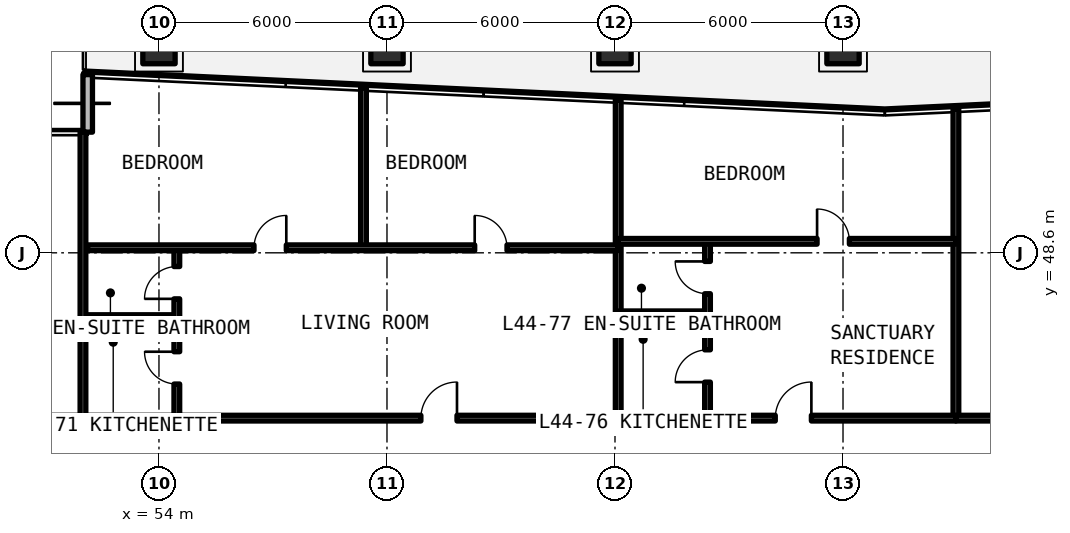
"""IFC4 building model, lengths in metres.
Left out: names, types, materials, properties, quantities, classifications, styles, units other than length and angle.
Written with IfcOpenShell. Run it as: python <this file> out.ifc"""

import sys

from ifc_helpers import new_model, si_unit, direction, frame, frame_2d, origin, origin_2d, place, context, subcontext, project, spatial, rectangle, extrude, element, fill, save


model = new_model("IFC4")
c1 = context("Model", 3, precision=1e-05, world=origin(), true_north=direction((0.0, 1.0)))
c2 = subcontext(c1, "Body", "Model", "MODEL_VIEW")
j1 = project(units=[si_unit("LENGTHUNIT", "METRE"), si_unit("PLANEANGLEUNIT", "RADIAN")], contexts=[c1])
p1 = place(None, origin())
s1 = spatial("IfcSite", under=j1, at=p1, CompositionType="ELEMENT")
p2 = place(p1, origin())
s2 = spatial("IfcBuilding", under=s1, at=p2, CompositionType="ELEMENT")
p3 = place(p2, frame((0.0, 0.0, 158.4)))
s3 = spatial("IfcBuildingStorey", under=s2, at=p3, CompositionType="ELEMENT", Elevation=158.4)
for number, where, z_axis, x_axis in (
    (1, (54.0, 54.0, 0.0), (0.0, 0.0, 1.0), (1.0, 0.0, 0.0)),
    (2, (60.0, 54.0, 0.0), (0.0, 0.0, 1.0), (1.0, 0.0, 0.0)),
    (3, (66.0, 54.0, 0.0), (0.0, 0.0, 1.0), (1.0, 0.0, 0.0)),
    (4, (72.0, 54.0, 0.0), (0.0, 0.0, 1.0), (1.0, 0.0, 0.0)),
):
    element("IfcColumn", number, at=place(p3, frame(where, z_axis=z_axis, x_axis=x_axis)), inside=s3, PredefinedType="COLUMN", context=c2, shape_type="SweptSolid", body=[
        extrude(rectangle(XDim=0.85, YDim=0.85, at=origin_2d()), origin(), (0.0, 0.0, 1.0), 3.63),
    ])
p4 = place(p3, frame((52.125, 53.289, 0.0), z_axis=(0.0, 0.0, 1.0), x_axis=(0.0, -1.0, 0.0)))
e5 = element("IfcWall", 5, at=p4, inside=s3, PredefinedType="SOLIDWALL", context=c2, shape_type="SweptSolid", body=[
    extrude(rectangle(XDim=1.514, YDim=0.25, at=frame_2d((0.757, 0.0))), origin(), (0.0, 0.0, 1.0), 3.41),
])
p5 = place(p3, frame((43.6, 44.25, 0.0), z_axis=(0.0, 0.0, 1.0), x_axis=(1.0, 0.0, 0.0)))
e6 = element("IfcWall", 6, at=p5, inside=s3, PredefinedType="SOLIDWALL", context=c2, shape_type="SweptSolid", body=[
    extrude(rectangle(XDim=8.4, YDim=0.15, at=frame_2d((4.2, 0.0))), origin(), (0.0, 0.0, 1.0), 2.63),
])
p6 = place(p5, frame((2.3, 0.0, 0.0)))
e7 = element("IfcOpeningElement", 7, at=p6, cuts=e6, PredefinedType="OPENING", context=c2, shape_type="SweptSolid", body=[
    extrude(rectangle(XDim=1.1, YDim=2.15, at=frame_2d((0.55, 1.075))), frame((0.0, 0.085, 0.0), z_axis=(0.0, -1.0, 0.0), x_axis=(1.0, 0.0, 0.0)), (0.0, 0.0, 1.0), 0.17),
])
p7 = place(p3, frame((52.0, 44.25, 0.0), z_axis=(0.0, 0.0, 1.0), x_axis=(0.0, 1.0, 0.0)))
e8 = element("IfcWall", 8, at=p7, inside=s3, PredefinedType="SOLIDWALL", context=c2, shape_type="SweptSolid", body=[
    extrude(rectangle(XDim=7.525, YDim=0.15, at=frame_2d((3.762, 0.0))), origin(), (0.0, 0.0, 1.0), 2.63),
])
p8 = place(p3, frame((66.084, 44.25, 0.0), z_axis=(0.0, 0.0, 1.0), x_axis=(0.0, 1.0, 0.0)))
e9 = element("IfcWall", 9, at=p8, inside=s3, PredefinedType="SOLIDWALL", context=c2, shape_type="SweptSolid", body=[
    extrude(rectangle(XDim=8.377, YDim=0.15, at=frame_2d((4.188, 0.0))), origin(), (0.0, 0.0, 1.0), 2.63),
])
p9 = place(p3, frame((52.12, 46.895, 0.0), z_axis=(0.0, 0.0, 1.0), x_axis=(1.0, 0.0, 0.0)))
e10 = element("IfcWall", 10, at=p9, inside=s3, PredefinedType="PARTITIONING", context=c2, shape_type="SweptSolid", body=[
    extrude(rectangle(XDim=2.35, YDim=0.15, at=frame_2d((1.175, 0.0))), origin(), (0.0, 0.0, 1.0), 2.63),
])
p10 = place(p3, frame((54.47, 44.25, 0.0), z_axis=(0.0, 0.0, 1.0), x_axis=(0.0, 1.0, 0.0)))
e11 = element("IfcWall", 11, at=p10, inside=s3, PredefinedType="PARTITIONING", context=c2, shape_type="SweptSolid", body=[
    extrude(rectangle(XDim=4.483, YDim=0.15, at=frame_2d((2.241, 0.0))), origin(), (0.0, 0.0, 1.0), 2.63),
])
p11 = place(p10, frame((0.897, 0.0, 0.0)))
e12 = element("IfcOpeningElement", 12, at=p11, cuts=e11, PredefinedType="OPENING", context=c2, shape_type="SweptSolid", body=[
    extrude(rectangle(XDim=0.85, YDim=2.1, at=frame_2d((0.425, 1.05))), frame((0.0, 0.085, 0.0), z_axis=(0.0, -1.0, 0.0), x_axis=(1.0, 0.0, 0.0)), (0.0, 0.0, 1.0), 0.17),
])
p12 = place(p10, frame((3.139, 0.0, 0.0)))
e13 = element("IfcOpeningElement", 13, at=p12, cuts=e11, PredefinedType="OPENING", context=c2, shape_type="SweptSolid", body=[
    extrude(rectangle(XDim=0.85, YDim=2.1, at=frame_2d((0.425, 1.05))), frame((0.0, 0.085, 0.0), z_axis=(0.0, -1.0, 0.0), x_axis=(1.0, 0.0, 0.0)), (0.0, 0.0, 1.0), 0.17),
])
p13 = place(p3, frame((59.382, 48.733, 0.0), z_axis=(0.0, 0.0, 1.0), x_axis=(0.0, 1.0, 0.0)))
e14 = element("IfcWall", 14, at=p13, inside=s3, PredefinedType="PARTITIONING", context=c2, shape_type="SweptSolid", body=[
    extrude(rectangle(XDim=4.212, YDim=0.15, at=frame_2d((2.106, 0.0))), origin(), (0.0, 0.0, 1.0), 2.63),
])
p14 = place(p3, frame((52.12, 48.733, 0.0), z_axis=(0.0, 0.0, 1.0), x_axis=(1.0, 0.0, 0.0)))
e15 = element("IfcWall", 15, at=p14, inside=s3, PredefinedType="PARTITIONING", context=c2, shape_type="SweptSolid", body=[
    extrude(rectangle(XDim=13.964, YDim=0.15, at=frame_2d((6.982, 0.0))), origin(), (0.0, 0.0, 1.0), 2.63),
])
p15 = place(p14, frame((4.381, 0.0, 0.0)))
e16 = element("IfcOpeningElement", 16, at=p15, cuts=e15, PredefinedType="OPENING", context=c2, shape_type="SweptSolid", body=[
    extrude(rectangle(XDim=0.85, YDim=2.1, at=frame_2d((0.425, 1.05))), frame((0.0, 0.085, 0.0), z_axis=(0.0, -1.0, 0.0), x_axis=(1.0, 0.0, 0.0)), (0.0, 0.0, 1.0), 0.17),
])
p16 = place(p14, frame((10.188, 0.0, 0.0)))
e17 = element("IfcOpeningElement", 17, at=p16, cuts=e15, PredefinedType="OPENING", context=c2, shape_type="SweptSolid", body=[
    extrude(rectangle(XDim=0.85, YDim=2.1, at=frame_2d((0.425, 1.05))), frame((0.0, 0.085, 0.0), z_axis=(0.0, -1.0, 0.0), x_axis=(1.0, 0.0, 0.0)), (0.0, 0.0, 1.0), 0.17),
])
p17 = place(p3, frame((52.12, 44.25, 0.0), z_axis=(0.0, 0.0, 1.0), x_axis=(1.0, 0.0, 0.0)))
e18 = element("IfcWall", 18, at=p17, inside=s3, PredefinedType="SOLIDWALL", context=c2, shape_type="SweptSolid", body=[
    extrude(rectangle(XDim=13.964, YDim=0.15, at=frame_2d((6.982, 0.0))), origin(), (0.0, 0.0, 1.0), 2.63),
])
p18 = place(p17, frame((8.772, 0.0, 0.0)))
e19 = element("IfcOpeningElement", 19, at=p18, cuts=e18, PredefinedType="OPENING", context=c2, shape_type="SweptSolid", body=[
    extrude(rectangle(XDim=0.95, YDim=2.15, at=frame_2d((0.475, 1.075))), frame((0.0, 0.085, 0.0), z_axis=(0.0, -1.0, 0.0), x_axis=(1.0, 0.0, 0.0)), (0.0, 0.0, 1.0), 0.17),
])
p19 = place(p3, frame((74.971, 44.25, 0.0), z_axis=(0.0, 0.0, 1.0), x_axis=(0.0, 1.0, 0.0)))
e20 = element("IfcWall", 20, at=p19, inside=s3, PredefinedType="SOLIDWALL", context=c2, shape_type="SweptSolid", body=[
    extrude(rectangle(XDim=8.134, YDim=0.15, at=frame_2d((4.067, 0.0))), origin(), (0.0, 0.0, 1.0), 2.63),
])
p20 = place(p3, frame((66.084, 46.995, 0.0), z_axis=(0.0, 0.0, 1.0), x_axis=(1.0, 0.0, 0.0)))
e21 = element("IfcWall", 21, at=p20, inside=s3, PredefinedType="PARTITIONING", context=c2, shape_type="SweptSolid", body=[
    extrude(rectangle(XDim=2.35, YDim=0.15, at=frame_2d((1.175, 0.0))), origin(), (0.0, 0.0, 1.0), 2.63),
])
p21 = place(p3, frame((68.434, 44.25, 0.0), z_axis=(0.0, 0.0, 1.0), x_axis=(0.0, 1.0, 0.0)))
e22 = element("IfcWall", 22, at=p21, inside=s3, PredefinedType="PARTITIONING", context=c2, shape_type="SweptSolid", body=[
    extrude(rectangle(XDim=4.652, YDim=0.15, at=frame_2d((2.326, 0.0))), origin(), (0.0, 0.0, 1.0), 2.63),
])
p22 = place(p21, frame((0.948, 0.0, 0.0)))
e23 = element("IfcOpeningElement", 23, at=p22, cuts=e22, PredefinedType="OPENING", context=c2, shape_type="SweptSolid", body=[
    extrude(rectangle(XDim=0.85, YDim=2.1, at=frame_2d((0.425, 1.05))), frame((0.0, 0.085, 0.0), z_axis=(0.0, -1.0, 0.0), x_axis=(1.0, 0.0, 0.0)), (0.0, 0.0, 1.0), 0.17),
])
p23 = place(p21, frame((3.273, 0.0, 0.0)))
e24 = element("IfcOpeningElement", 24, at=p23, cuts=e22, PredefinedType="OPENING", context=c2, shape_type="SweptSolid", body=[
    extrude(rectangle(XDim=0.85, YDim=2.1, at=frame_2d((0.425, 1.05))), frame((0.0, 0.085, 0.0), z_axis=(0.0, -1.0, 0.0), x_axis=(1.0, 0.0, 0.0)), (0.0, 0.0, 1.0), 0.17),
])
p24 = place(p3, frame((66.084, 48.902, 0.0), z_axis=(0.0, 0.0, 1.0), x_axis=(1.0, 0.0, 0.0)))
e25 = element("IfcWall", 25, at=p24, inside=s3, PredefinedType="PARTITIONING", context=c2, shape_type="SweptSolid", body=[
    extrude(rectangle(XDim=8.886, YDim=0.15, at=frame_2d((4.443, 0.0))), origin(), (0.0, 0.0, 1.0), 2.63),
])
p25 = place(p24, frame((5.233, 0.0, 0.0)))
e26 = element("IfcOpeningElement", 26, at=p25, cuts=e25, PredefinedType="OPENING", context=c2, shape_type="SweptSolid", body=[
    extrude(rectangle(XDim=0.85, YDim=2.1, at=frame_2d((0.425, 1.05))), frame((0.0, 0.085, 0.0), z_axis=(0.0, -1.0, 0.0), x_axis=(1.0, 0.0, 0.0)), (0.0, 0.0, 1.0), 0.17),
])
p26 = place(p3, frame((66.084, 44.25, 0.0), z_axis=(0.0, 0.0, 1.0), x_axis=(1.0, 0.0, 0.0)))
e27 = element("IfcWall", 27, at=p26, inside=s3, PredefinedType="SOLIDWALL", context=c2, shape_type="SweptSolid", body=[
    extrude(rectangle(XDim=8.886, YDim=0.15, at=frame_2d((4.443, 0.0))), origin(), (0.0, 0.0, 1.0), 2.63),
])
p27 = place(p26, frame((4.133, 0.0, 0.0)))
e28 = element("IfcOpeningElement", 28, at=p27, cuts=e27, PredefinedType="OPENING", context=c2, shape_type="SweptSolid", body=[
    extrude(rectangle(XDim=0.95, YDim=2.15, at=frame_2d((0.475, 1.075))), frame((0.0, 0.085, 0.0), z_axis=(0.0, -1.0, 0.0), x_axis=(1.0, 0.0, 0.0)), (0.0, 0.0, 1.0), 0.17),
])
p28 = place(p3, frame((74.971, 44.25, 0.0), z_axis=(0.0, 0.0, 1.0), x_axis=(1.0, 0.0, 0.0)))
e29 = element("IfcWall", 29, at=p28, inside=s3, PredefinedType="SOLIDWALL", context=c2, shape_type="SweptSolid", body=[
    extrude(rectangle(XDim=11.743, YDim=0.15, at=frame_2d((5.872, 0.0))), origin(), (0.0, 0.0, 1.0), 2.63),
])
p29 = place(p28, frame((5.321, 0.0, 0.0)))
e30 = element("IfcOpeningElement", 30, at=p29, cuts=e29, PredefinedType="OPENING", context=c2, shape_type="SweptSolid", body=[
    extrude(rectangle(XDim=1.1, YDim=2.15, at=frame_2d((0.55, 1.075))), frame((0.0, 0.085, 0.0), z_axis=(0.0, -1.0, 0.0), x_axis=(1.0, 0.0, 0.0)), (0.0, 0.0, 1.0), 0.17),
])
p30 = place(p11, origin())
e31 = element("IfcDoor", 31, at=p30, inside=s3, OperationType="SINGLE_SWING_RIGHT", PredefinedType="DOOR", context=c2, shape_type="SweptSolid", body=[
    extrude(rectangle(XDim=0.85, YDim=2.1, at=frame_2d((0.425, 1.05))), frame((0.0, 0.025, 0.0), z_axis=(0.0, -1.0, 0.0), x_axis=(1.0, 0.0, 0.0)), (0.0, 0.0, 1.0), 0.05),
])
fill(e12, e31)
p31 = place(p12, origin())
e32 = element("IfcDoor", 32, at=p31, inside=s3, OperationType="SINGLE_SWING_LEFT", PredefinedType="DOOR", context=c2, shape_type="SweptSolid", body=[
    extrude(rectangle(XDim=0.85, YDim=2.1, at=frame_2d((0.425, 1.05))), frame((0.0, 0.025, 0.0), z_axis=(0.0, -1.0, 0.0), x_axis=(1.0, 0.0, 0.0)), (0.0, 0.0, 1.0), 0.05),
])
fill(e13, e32)
p32 = place(p15, origin())
e33 = element("IfcDoor", 33, at=p32, inside=s3, OperationType="SINGLE_SWING_RIGHT", PredefinedType="DOOR", context=c2, shape_type="SweptSolid", body=[
    extrude(rectangle(XDim=0.85, YDim=2.1, at=frame_2d((0.425, 1.05))), frame((0.0, 0.025, 0.0), z_axis=(0.0, -1.0, 0.0), x_axis=(1.0, 0.0, 0.0)), (0.0, 0.0, 1.0), 0.05),
])
fill(e16, e33)
p33 = place(p16, origin())
e34 = element("IfcDoor", 34, at=p33, inside=s3, OperationType="SINGLE_SWING_LEFT", PredefinedType="DOOR", context=c2, shape_type="SweptSolid", body=[
    extrude(rectangle(XDim=0.85, YDim=2.1, at=frame_2d((0.425, 1.05))), frame((0.0, 0.025, 0.0), z_axis=(0.0, -1.0, 0.0), x_axis=(1.0, 0.0, 0.0)), (0.0, 0.0, 1.0), 0.05),
])
fill(e17, e34)
p34 = place(p18, origin())
e35 = element("IfcDoor", 35, at=p34, inside=s3, OperationType="SINGLE_SWING_RIGHT", PredefinedType="DOOR", context=c2, shape_type="SweptSolid", body=[
    extrude(rectangle(XDim=0.95, YDim=2.15, at=frame_2d((0.475, 1.075))), frame((0.0, 0.025, 0.0), z_axis=(0.0, -1.0, 0.0), x_axis=(1.0, 0.0, 0.0)), (0.0, 0.0, 1.0), 0.05),
])
fill(e19, e35)
p35 = place(p22, origin())
e36 = element("IfcDoor", 36, at=p35, inside=s3, OperationType="SINGLE_SWING_LEFT", PredefinedType="DOOR", context=c2, shape_type="SweptSolid", body=[
    extrude(rectangle(XDim=0.85, YDim=2.1, at=frame_2d((0.425, 1.05))), frame((0.0, 0.025, 0.0), z_axis=(0.0, -1.0, 0.0), x_axis=(1.0, 0.0, 0.0)), (0.0, 0.0, 1.0), 0.05),
])
fill(e23, e36)
p36 = place(p23, origin())
e37 = element("IfcDoor", 37, at=p36, inside=s3, OperationType="SINGLE_SWING_RIGHT", PredefinedType="DOOR", context=c2, shape_type="SweptSolid", body=[
    extrude(rectangle(XDim=0.85, YDim=2.1, at=frame_2d((0.425, 1.05))), frame((0.0, 0.025, 0.0), z_axis=(0.0, -1.0, 0.0), x_axis=(1.0, 0.0, 0.0)), (0.0, 0.0, 1.0), 0.05),
])
fill(e24, e37)
p37 = place(p25, origin())
e38 = element("IfcDoor", 38, at=p37, inside=s3, OperationType="SINGLE_SWING_LEFT", PredefinedType="DOOR", context=c2, shape_type="SweptSolid", body=[
    extrude(rectangle(XDim=0.85, YDim=2.1, at=frame_2d((0.425, 1.05))), frame((0.0, 0.025, 0.0), z_axis=(0.0, -1.0, 0.0), x_axis=(1.0, 0.0, 0.0)), (0.0, 0.0, 1.0), 0.05),
])
fill(e26, e38)
p38 = place(p27, origin())
e39 = element("IfcDoor", 39, at=p38, inside=s3, OperationType="SINGLE_SWING_RIGHT", PredefinedType="DOOR", context=c2, shape_type="SweptSolid", body=[
    extrude(rectangle(XDim=0.95, YDim=2.15, at=frame_2d((0.475, 1.075))), frame((0.0, 0.025, 0.0), z_axis=(0.0, -1.0, 0.0), x_axis=(1.0, 0.0, 0.0)), (0.0, 0.0, 1.0), 0.05),
])
fill(e28, e39)
save(model, sys.argv[1])
